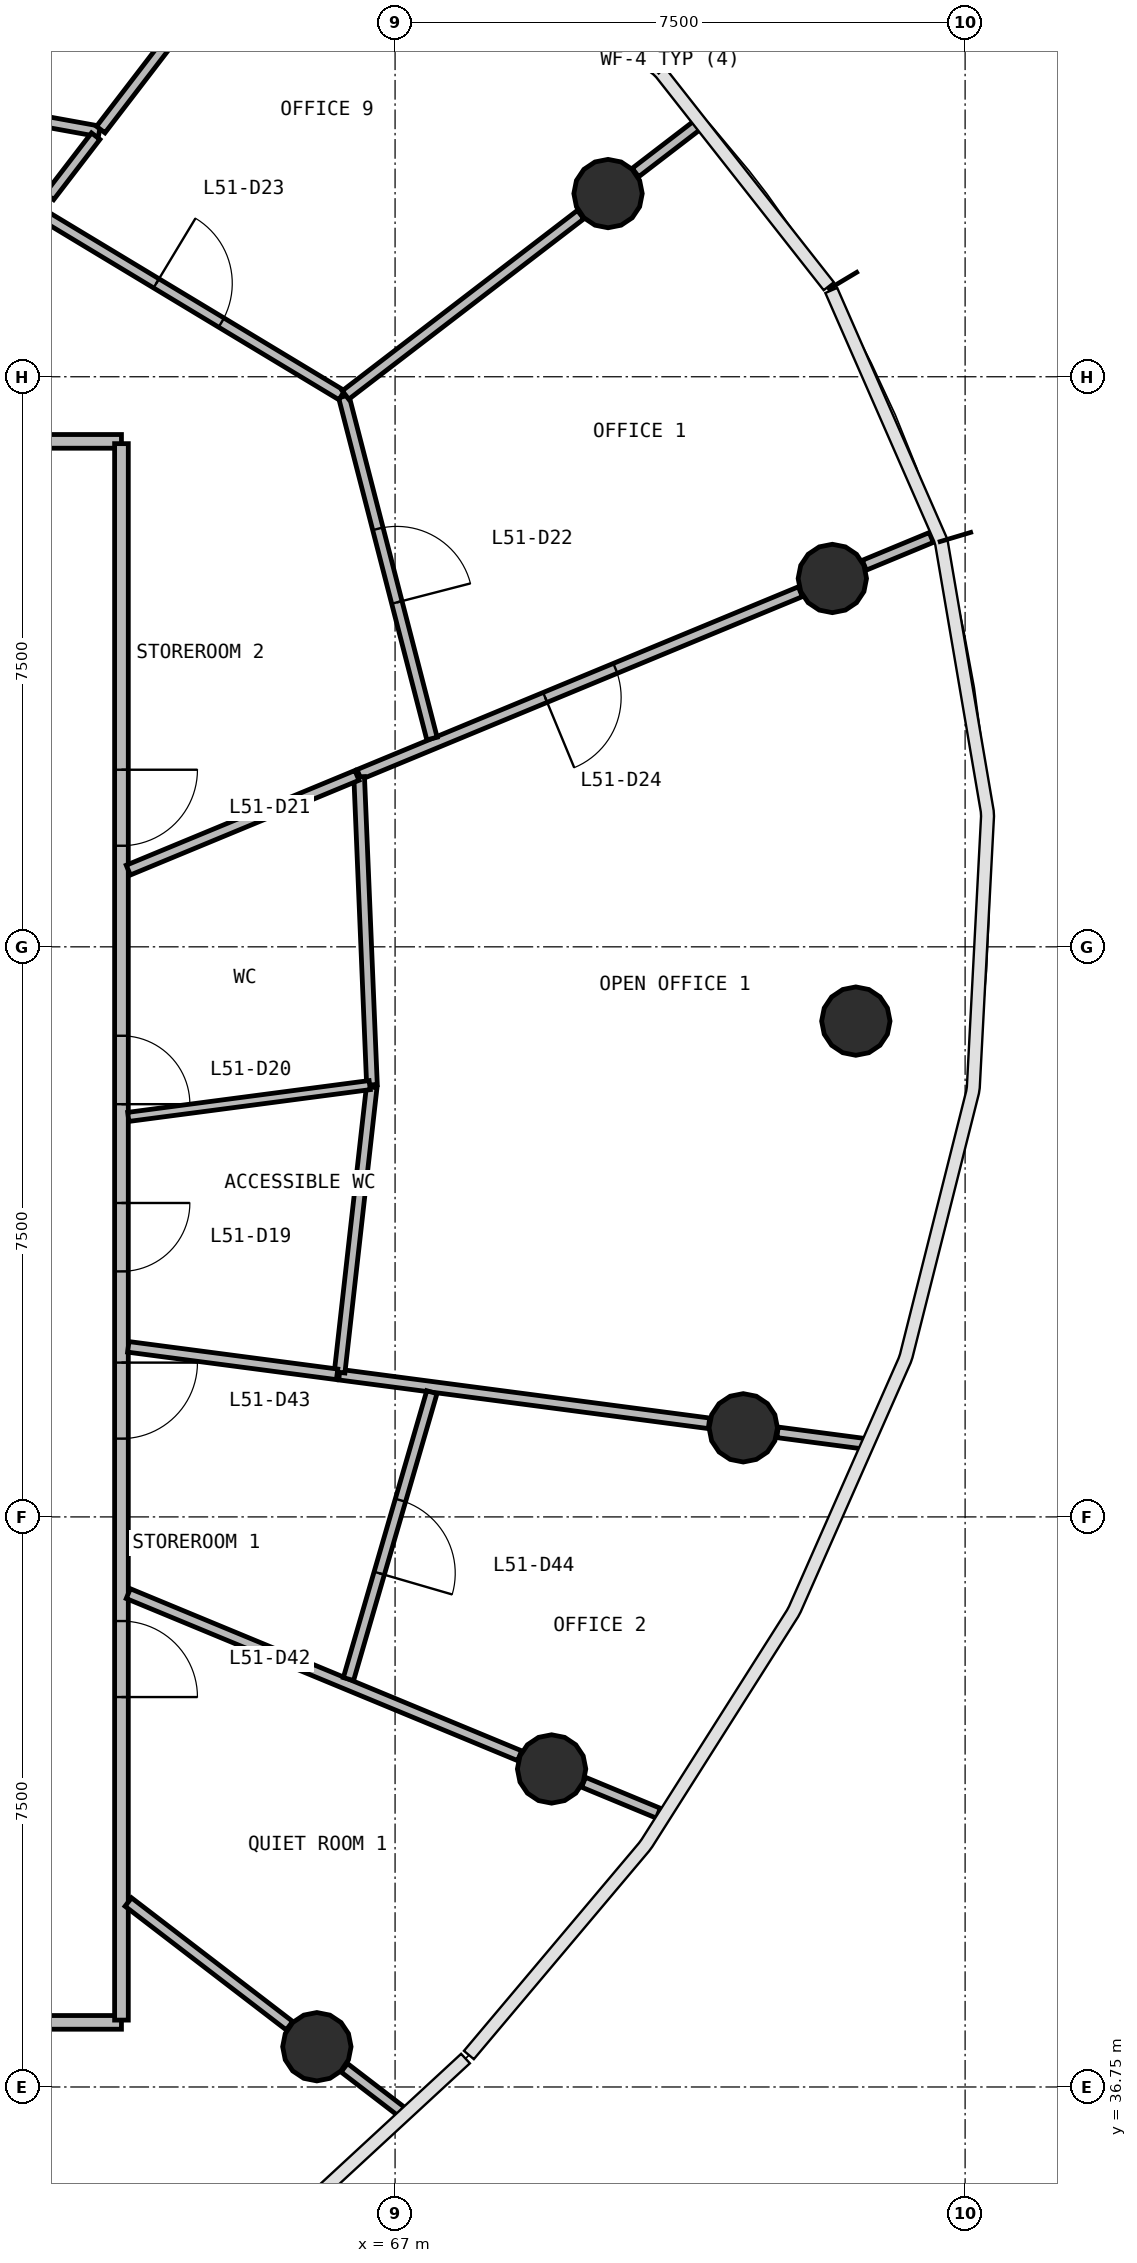
"""IFC4 building model, lengths in metres.
Left out: names, types, materials, properties, quantities, classifications, styles, units other than length and angle.
Written with IfcOpenShell. Run it as: python <this file> out.ifc"""

import sys

from ifc_helpers import new_model, si_unit, direction, frame, frame_2d, origin, origin_2d, place, context, subcontext, project, spatial, rectangle, circle, extrude, source, transform, mapped, element, fill, save


model = new_model("IFC4")
c1 = context("Model", 3, precision=1e-05, world=origin(), true_north=direction((0.0, 1.0)))
c2 = subcontext(c1, "Body", "Model", "MODEL_VIEW")
j1 = project(units=[si_unit("LENGTHUNIT", "METRE"), si_unit("PLANEANGLEUNIT", "RADIAN")], contexts=[c1])
p1 = place(None, origin())
s1 = spatial("IfcSite", under=j1, at=p1, CompositionType="ELEMENT")
p2 = place(p1, origin())
s2 = spatial("IfcBuilding", under=s1, at=p2, CompositionType="ELEMENT")
p3 = place(p2, frame((0.0, 0.0, 211.1)))
s3 = spatial("IfcBuildingStorey", under=s2, at=p3, CompositionType="ELEMENT", Elevation=211.1)
m1 = source(origin(), c2, "Body", "SweptSolid", [
    extrude(circle(Radius=0.45, at=origin_2d()), origin(), (0.0, 0.0, 1.0), 3.9),
])
for number, where, z_axis, x_axis in (
    (1, (73.062, 50.773, 0.0), (0.0, 0.0, 1.0), (1.0, 0.0, 0.0)),
    (2, (72.753, 56.596, 0.0), (0.0, 0.0, 1.0), (1.0, 0.0, 0.0)),
    (3, (69.802, 61.66, 0.0), (0.0, 0.0, 1.0), (1.0, 0.0, 0.0)),
    (4, (65.971, 37.28, 0.0), (0.0, 0.0, 1.0), (1.0, 0.0, 0.0)),
    (5, (69.059, 40.934, 0.0), (0.0, 0.0, 1.0), (1.0, 0.0, 0.0)),
    (6, (71.581, 45.422, 0.0), (0.0, 0.0, 1.0), (1.0, 0.0, 0.0)),
):
    element("IfcColumn", number, at=place(p3, frame(where, z_axis=z_axis, x_axis=x_axis)), inside=s3, PredefinedType="COLUMN", context=c2, shape_type="MappedRepresentation", body=[
        mapped(m1, transform((0.0, 0.0, 0.0), scale=1.0)),
    ])
p4 = place(p3, frame((40.6, 58.4, 0.0), z_axis=(0.0, 0.0, 1.0), x_axis=(1.0, 0.0, 0.0)))
e7 = element("IfcWall", 7, at=p4, inside=s3, PredefinedType="PARTITIONING", context=c2, shape_type="SweptSolid", body=[
    extrude(rectangle(XDim=22.8, YDim=0.18, at=frame_2d((11.4, 0.0))), origin(), (0.0, 0.0, 1.0), 2.88),
])
p5 = place(p4, frame((12.95, 0.0, 0.0)))
e8 = element("IfcOpeningElement", 8, at=p5, cuts=e7, PredefinedType="OPENING", context=c2, shape_type="SweptSolid", body=[
    extrude(rectangle(XDim=1.0, YDim=2.1, at=frame_2d((0.5, 1.05))), frame((0.0, 0.1, 0.0), z_axis=(0.0, -1.0, 0.0), x_axis=(1.0, 0.0, 0.0)), (0.0, 0.0, 1.0), 0.2),
])
p6 = place(p4, frame((10.95, 0.0, 0.0)))
e9 = element("IfcOpeningElement", 9, at=p6, cuts=e7, PredefinedType="OPENING", context=c2, shape_type="SweptSolid", body=[
    extrude(rectangle(XDim=1.0, YDim=2.1, at=frame_2d((0.5, 1.05))), frame((0.0, 0.1, 0.0), z_axis=(0.0, -1.0, 0.0), x_axis=(1.0, 0.0, 0.0)), (0.0, 0.0, 1.0), 0.2),
])
p7 = place(p3, frame((63.4, 37.6, 0.0), z_axis=(0.0, 0.0, 1.0), x_axis=(-1.0, 0.0, 0.0)))
e10 = element("IfcWall", 10, at=p7, inside=s3, PredefinedType="PARTITIONING", context=c2, shape_type="SweptSolid", body=[
    extrude(rectangle(XDim=22.8, YDim=0.18, at=frame_2d((11.4, 0.0))), origin(), (0.0, 0.0, 1.0), 2.88),
])
p8 = place(p7, frame((12.95, 0.0, 0.0)))
e11 = element("IfcOpeningElement", 11, at=p8, cuts=e10, PredefinedType="OPENING", context=c2, shape_type="SweptSolid", body=[
    extrude(rectangle(XDim=1.0, YDim=2.1, at=frame_2d((0.5, 1.05))), frame((0.0, 0.1, 0.0), z_axis=(0.0, -1.0, 0.0), x_axis=(1.0, 0.0, 0.0)), (0.0, 0.0, 1.0), 0.2),
])
p9 = place(p7, frame((10.95, 0.0, 0.0)))
e12 = element("IfcOpeningElement", 12, at=p9, cuts=e10, PredefinedType="OPENING", context=c2, shape_type="SweptSolid", body=[
    extrude(rectangle(XDim=1.0, YDim=2.1, at=frame_2d((0.5, 1.05))), frame((0.0, 0.1, 0.0), z_axis=(0.0, -1.0, 0.0), x_axis=(1.0, 0.0, 0.0)), (0.0, 0.0, 1.0), 0.2),
])
p10 = place(p7, frame((5.75, 0.0, 0.0)))
e13 = element("IfcOpeningElement", 13, at=p10, cuts=e10, PredefinedType="OPENING", context=c2, shape_type="SweptSolid", body=[
    extrude(rectangle(XDim=1.0, YDim=2.1, at=frame_2d((0.5, 1.05))), frame((0.0, 0.1, 0.0), z_axis=(0.0, -1.0, 0.0), x_axis=(1.0, 0.0, 0.0)), (0.0, 0.0, 1.0), 0.2),
])
p11 = place(p3, frame((63.4, 58.37, 0.0), z_axis=(0.0, 0.0, 1.0), x_axis=(0.0, -1.0, 0.0)))
e14 = element("IfcWall", 14, at=p11, inside=s3, PredefinedType="PARTITIONING", context=c2, shape_type="SweptSolid", body=[
    extrude(rectangle(XDim=20.74, YDim=0.18, at=frame_2d((10.37, 0.0))), origin(), (0.0, 0.0, 1.0), 2.88),
])
p12 = place(p11, frame((9.99, 0.0, 0.0)))
e15 = element("IfcOpeningElement", 15, at=p12, cuts=e14, PredefinedType="OPENING", context=c2, shape_type="SweptSolid", body=[
    extrude(rectangle(XDim=0.9, YDim=2.1, at=frame_2d((0.45, 1.05))), frame((0.0, 0.1, 0.0), z_axis=(0.0, -1.0, 0.0), x_axis=(1.0, 0.0, 0.0)), (0.0, 0.0, 1.0), 0.2),
])
p13 = place(p11, frame((7.79, 0.0, 0.0)))
e16 = element("IfcOpeningElement", 16, at=p13, cuts=e14, PredefinedType="OPENING", context=c2, shape_type="SweptSolid", body=[
    extrude(rectangle(XDim=0.9, YDim=2.1, at=frame_2d((0.45, 1.05))), frame((0.0, 0.1, 0.0), z_axis=(0.0, -1.0, 0.0), x_axis=(1.0, 0.0, 0.0)), (0.0, 0.0, 1.0), 0.2),
])
p14 = place(p11, frame((4.29, 0.0, 0.0)))
e17 = element("IfcOpeningElement", 17, at=p14, cuts=e14, PredefinedType="OPENING", context=c2, shape_type="SweptSolid", body=[
    extrude(rectangle(XDim=1.0, YDim=2.1, at=frame_2d((0.5, 1.05))), frame((0.0, 0.1, 0.0), z_axis=(0.0, -1.0, 0.0), x_axis=(1.0, 0.0, 0.0)), (0.0, 0.0, 1.0), 0.2),
])
p15 = place(p11, frame((15.49, 0.0, 0.0)))
e18 = element("IfcOpeningElement", 18, at=p15, cuts=e14, PredefinedType="OPENING", context=c2, shape_type="SweptSolid", body=[
    extrude(rectangle(XDim=1.0, YDim=2.1, at=frame_2d((0.5, 1.05))), frame((0.0, 0.1, 0.0), z_axis=(0.0, -1.0, 0.0), x_axis=(1.0, 0.0, 0.0)), (0.0, 0.0, 1.0), 0.2),
])
p16 = place(p11, frame((12.09, 0.0, 0.0)))
e19 = element("IfcOpeningElement", 19, at=p16, cuts=e14, PredefinedType="OPENING", context=c2, shape_type="SweptSolid", body=[
    extrude(rectangle(XDim=1.0, YDim=2.1, at=frame_2d((0.5, 1.05))), frame((0.0, 0.1, 0.0), z_axis=(0.0, -1.0, 0.0), x_axis=(1.0, 0.0, 0.0)), (0.0, 0.0, 1.0), 0.2),
])
p17 = place(p3, frame((72.333, 56.422, 0.0), z_axis=(0.0, 0.0, 1.0), x_axis=(-0.92388853292, -0.382661702733, 0.0)))
e20 = element("IfcWall", 20, at=p17, inside=s3, PredefinedType="PARTITIONING", context=c2, shape_type="SweptSolid", body=[
    extrude(rectangle(XDim=6.285, YDim=0.14, at=frame_2d((3.143, 0.0))), origin(), (0.0, 0.0, 1.0), 2.88),
])
p18 = place(p17, frame((2.635, 0.0, 0.0)))
e21 = element("IfcOpeningElement", 21, at=p18, cuts=e20, PredefinedType="OPENING", context=c2, shape_type="SweptSolid", body=[
    extrude(rectangle(XDim=1.0, YDim=2.1, at=frame_2d((0.5, 1.05))), frame((0.0, 0.08, 0.0), z_axis=(0.0, -1.0, 0.0), x_axis=(1.0, 0.0, 0.0)), (0.0, 0.0, 1.0), 0.16),
])
p19 = place(p3, frame((68.639, 41.108, 0.0), z_axis=(0.0, 0.0, 1.0), x_axis=(-0.9238758778, 0.382692255499, 0.0)))
e22 = element("IfcWall", 22, at=p19, inside=s3, PredefinedType="PARTITIONING", context=c2, shape_type="SweptSolid", body=[
    extrude(rectangle(XDim=5.573, YDim=0.14, at=frame_2d((2.787, 0.0))), origin(), (0.0, 0.0, 1.0), 2.88),
])
p20 = place(p3, frame((66.267, 46.122, 0.0), z_axis=(0.0, 0.0, 1.0), x_axis=(0.991448195842, -0.130500861923, 0.0)))
e23 = element("IfcWall", 23, at=p20, inside=s3, PredefinedType="PARTITIONING", context=c2, shape_type="SweptSolid", body=[
    extrude(rectangle(XDim=4.905, YDim=0.14, at=frame_2d((2.453, 0.0))), origin(), (0.0, 0.0, 1.0), 2.88),
])
p21 = place(p3, frame((58.354, 63.339, 0.0), z_axis=(0.0, 0.0, 1.0), x_axis=(0.983980456021, -0.178276364581, 0.0)))
e24 = element("IfcWall", 24, at=p21, inside=s3, PredefinedType="PARTITIONING", context=c2, shape_type="SweptSolid", body=[
    extrude(rectangle(XDim=4.833, YDim=0.14, at=frame_2d((2.417, 0.0))), origin(), (0.0, 0.0, 1.0), 2.88),
])
p22 = place(p21, frame((1.983, 0.0, 0.0)))
e25 = element("IfcOpeningElement", 25, at=p22, cuts=e24, PredefinedType="OPENING", context=c2, shape_type="SweptSolid", body=[
    extrude(rectangle(XDim=1.0, YDim=2.1, at=frame_2d((0.5, 1.05))), frame((0.0, 0.08, 0.0), z_axis=(0.0, -1.0, 0.0), x_axis=(1.0, 0.0, 0.0)), (0.0, 0.0, 1.0), 0.16),
])
p23 = place(p3, frame((66.324, 58.991, 0.0), z_axis=(0.0, 0.0, 1.0), x_axis=(0.249819251726, -0.968292487561, 0.0)))
e26 = element("IfcWall", 26, at=p23, inside=s3, PredefinedType="PARTITIONING", context=c2, shape_type="SweptSolid", body=[
    extrude(rectangle(XDim=4.649, YDim=0.14, at=frame_2d((2.324, 0.0))), origin(), (0.0, 0.0, 1.0), 2.88),
])
p24 = place(p23, frame((1.799, 0.0, 0.0)))
e27 = element("IfcOpeningElement", 27, at=p24, cuts=e26, PredefinedType="OPENING", context=c2, shape_type="SweptSolid", body=[
    extrude(rectangle(XDim=1.0, YDim=2.1, at=frame_2d((0.5, 1.05))), frame((0.0, 0.08, 0.0), z_axis=(0.0, -1.0, 0.0), x_axis=(1.0, 0.0, 0.0)), (0.0, 0.0, 1.0), 0.16),
])
p25 = place(p3, frame((62.298, 61.42, 0.0), z_axis=(0.0, 0.0, 1.0), x_axis=(0.856310382511, -0.516461546298, 0.0)))
e28 = element("IfcWall", 28, at=p25, inside=s3, PredefinedType="PARTITIONING", context=c2, shape_type="SweptSolid", body=[
    extrude(rectangle(XDim=4.672, YDim=0.14, at=frame_2d((2.336, 0.0))), origin(), (0.0, 0.0, 1.0), 2.88),
])
p26 = place(p25, frame((1.823, 0.0, 0.0)))
e29 = element("IfcOpeningElement", 29, at=p26, cuts=e28, PredefinedType="OPENING", context=c2, shape_type="SweptSolid", body=[
    extrude(rectangle(XDim=1.0, YDim=2.1, at=frame_2d((0.5, 1.05))), frame((0.0, 0.08, 0.0), z_axis=(0.0, -1.0, 0.0), x_axis=(1.0, 0.0, 0.0)), (0.0, 0.0, 1.0), 0.16),
])
p27 = place(p3, frame((66.696, 49.935, 0.0), z_axis=(0.0, 0.0, 1.0), x_axis=(-0.041535399008, 0.999137032959, 0.0)))
e30 = element("IfcWall", 30, at=p27, inside=s3, PredefinedType="PARTITIONING", context=c2, shape_type="SweptSolid", body=[
    extrude(rectangle(XDim=4.056, YDim=0.14, at=frame_2d((2.028, 0.0))), origin(), (0.0, 0.0, 1.0), 2.88),
])
p28 = place(p3, frame((67.484, 45.891, 0.0), z_axis=(0.0, 0.0, 1.0), x_axis=(-0.279262901939, -0.960214679955, 0.0)))
e31 = element("IfcWall", 31, at=p28, inside=s3, PredefinedType="PARTITIONING", context=c2, shape_type="SweptSolid", body=[
    extrude(rectangle(XDim=3.931, YDim=0.14, at=frame_2d((1.965, 0.0))), origin(), (0.0, 0.0, 1.0), 2.88),
])
p29 = place(p28, frame((1.481, 0.0, 0.0)))
e32 = element("IfcOpeningElement", 32, at=p29, cuts=e31, PredefinedType="OPENING", context=c2, shape_type="SweptSolid", body=[
    extrude(rectangle(XDim=1.0, YDim=2.1, at=frame_2d((0.5, 1.05))), frame((0.0, 0.08, 0.0), z_axis=(0.0, -1.0, 0.0), x_axis=(1.0, 0.0, 0.0)), (0.0, 0.0, 1.0), 0.16),
])
p30 = place(p3, frame((66.348, 59.01, 0.0), z_axis=(0.0, 0.0, 1.0), x_axis=(0.793347300472, 0.608769300173, 0.0)))
e33 = element("IfcWall", 33, at=p30, inside=s3, PredefinedType="PARTITIONING", context=c2, shape_type="SweptSolid", body=[
    extrude(rectangle(XDim=3.899, YDim=0.14, at=frame_2d((1.95, 0.0))), origin(), (0.0, 0.0, 1.0), 2.88),
])
p31 = place(p3, frame((66.271, 46.152, 0.0), z_axis=(0.0, 0.0, 1.0), x_axis=(0.111758070994, 0.993735444456, 0.0)))
e34 = element("IfcWall", 34, at=p31, inside=s3, PredefinedType="PARTITIONING", context=c2, shape_type="SweptSolid", body=[
    extrude(rectangle(XDim=3.777, YDim=0.14, at=frame_2d((1.889, 0.0))), origin(), (0.0, 0.0, 1.0), 2.88),
])
p32 = place(p3, frame((62.453, 61.622, 0.0), z_axis=(0.0, 0.0, 1.0), x_axis=(0.608872401912, 0.793268175455, 0.0)))
e35 = element("IfcWall", 35, at=p32, inside=s3, PredefinedType="PARTITIONING", context=c2, shape_type="SweptSolid", body=[
    extrude(rectangle(XDim=1.0, YDim=0.14, at=frame_2d((0.5, 0.0))), origin(), (0.0, 0.0, 1.0), 2.88),
])
p33 = place(p3, frame((63.127, 62.501, 0.0), z_axis=(0.0, 0.0, 1.0), x_axis=(0.608750837214, 0.793361467549, 0.0)))
e36 = element("IfcWall", 36, at=p33, inside=s3, PredefinedType="PARTITIONING", context=c2, shape_type="SweptSolid", body=[
    extrude(rectangle(XDim=2.472, YDim=0.14, at=frame_2d((1.236, 0.0))), origin(), (0.0, 0.0, 1.0), 2.88),
])
p34 = place(p3, frame((63.49, 52.759, 0.0), z_axis=(0.0, 0.0, 1.0), x_axis=(0.923862401464, 0.382724787753, 0.0)))
e37 = element("IfcWall", 37, at=p34, inside=s3, PredefinedType="PARTITIONING", context=c2, shape_type="SweptSolid", body=[
    extrude(rectangle(XDim=3.257, YDim=0.14, at=frame_2d((1.628, 0.0))), origin(), (0.0, 0.0, 1.0), 2.88),
])
p35 = place(p3, frame((63.49, 46.487, 0.0), z_axis=(0.0, 0.0, 1.0), x_axis=(0.991438994906, -0.13057074473, 0.0)))
e38 = element("IfcWall", 38, at=p35, inside=s3, PredefinedType="PARTITIONING", context=c2, shape_type="SweptSolid", body=[
    extrude(rectangle(XDim=2.771, YDim=0.14, at=frame_2d((1.385, 0.0))), origin(), (0.0, 0.0, 1.0), 2.88),
])
p36 = place(p3, frame((63.49, 39.183, 0.0), z_axis=(0.0, 0.0, 1.0), x_axis=(0.793363703091, -0.608747923707, 0.0)))
e39 = element("IfcWall", 39, at=p36, inside=s3, PredefinedType="PARTITIONING", context=c2, shape_type="SweptSolid", body=[
    extrude(rectangle(XDim=2.673, YDim=0.14, at=frame_2d((1.336, 0.0))), origin(), (0.0, 0.0, 1.0), 2.88),
])
p37 = place(p3, frame((72.031, 45.363, 0.0), z_axis=(0.0, 0.0, 1.0), x_axis=(0.99143621724, -0.130591834141, 0.0)))
e40 = element("IfcWall", 40, at=p37, inside=s3, PredefinedType="PARTITIONING", context=c2, shape_type="SweptSolid", body=[
    extrude(rectangle(XDim=1.15, YDim=0.14, at=frame_2d((0.575, 0.0))), origin(), (0.0, 0.0, 1.0), 2.88),
])
p38 = place(p3, frame((70.464, 40.352, 0.0), z_axis=(0.0, 0.0, 1.0), x_axis=(-0.923921911664, 0.382581104012, 0.0)))
e41 = element("IfcWall", 41, at=p38, inside=s3, PredefinedType="PARTITIONING", context=c2, shape_type="SweptSolid", body=[
    extrude(rectangle(XDim=1.066, YDim=0.14, at=frame_2d((0.533, 0.0))), origin(), (0.0, 0.0, 1.0), 2.88),
])
p39 = place(p3, frame((70.163, 61.937, 0.0), z_axis=(0.0, 0.0, 1.0), x_axis=(0.793403619358, 0.608695898449, 0.0)))
e42 = element("IfcWall", 42, at=p39, inside=s3, PredefinedType="PARTITIONING", context=c2, shape_type="SweptSolid", body=[
    extrude(rectangle(XDim=1.047, YDim=0.14, at=frame_2d((0.523, 0.0))), origin(), (0.0, 0.0, 1.0), 2.88),
])
p40 = place(p3, frame((73.174, 56.77, 0.0), z_axis=(0.0, 0.0, 1.0), x_axis=(0.923779659408, 0.38292445843, 0.0)))
e43 = element("IfcWall", 43, at=p40, inside=s3, PredefinedType="PARTITIONING", context=c2, shape_type="SweptSolid", body=[
    extrude(rectangle(XDim=0.954, YDim=0.14, at=frame_2d((0.477, 0.0))), origin(), (0.0, 0.0, 1.0), 2.88),
])
p41 = place(p3, frame((66.332, 37.003, 0.0), z_axis=(0.0, 0.0, 1.0), x_axis=(0.793344167197, -0.608773383431, 0.0)))
e44 = element("IfcWall", 44, at=p41, inside=s3, PredefinedType="PARTITIONING", context=c2, shape_type="SweptSolid", body=[
    extrude(rectangle(XDim=0.944, YDim=0.14, at=frame_2d((0.472, 0.0))), origin(), (0.0, 0.0, 1.0), 2.88),
])
p42 = place(p3, frame((63.49, 49.513, 0.0), z_axis=(0.0, 0.0, 1.0), x_axis=(0.991442878973, 0.130541249168, 0.0)))
e45 = element("IfcWall", 45, at=p42, inside=s3, PredefinedType="PARTITIONING", context=c2, shape_type="SweptSolid", body=[
    extrude(rectangle(XDim=3.204, YDim=0.12, at=frame_2d((1.602, 0.0))), origin(), (0.0, 0.0, 1.0), 2.88),
])
m2 = source(origin(), c2, "Body", "SweptSolid", [
    extrude(rectangle(XDim=0.9, YDim=2.1, at=frame_2d((0.45, 1.05))), frame((0.0, 0.025, 0.0), z_axis=(0.0, -1.0, 0.0), x_axis=(1.0, 0.0, 0.0)), (0.0, 0.0, 1.0), 0.05),
])
p43 = place(p12, origin())
e46 = element("IfcDoor", 46, at=p43, inside=s3, OperationType="SINGLE_SWING_LEFT", PredefinedType="DOOR", context=c2, shape_type="MappedRepresentation", body=[
    mapped(m2, transform((0.0, 0.0, 0.0), scale=1.0)),
])
fill(e15, e46)
p44 = place(p13, origin())
e47 = element("IfcDoor", 47, at=p44, inside=s3, OperationType="SINGLE_SWING_RIGHT", PredefinedType="DOOR", context=c2, shape_type="MappedRepresentation", body=[
    mapped(m2, transform((0.0, 0.0, 0.0), scale=1.0)),
])
fill(e16, e47)
m3 = source(origin(), c2, "Body", "SweptSolid", [
    extrude(rectangle(XDim=1.0, YDim=2.1, at=frame_2d((0.5, 1.05))), frame((0.0, 0.025, 0.0), z_axis=(0.0, -1.0, 0.0), x_axis=(1.0, 0.0, 0.0)), (0.0, 0.0, 1.0), 0.05),
])
p45 = place(p14, origin())
e48 = element("IfcDoor", 48, at=p45, inside=s3, OperationType="SINGLE_SWING_LEFT", PredefinedType="DOOR", context=c2, shape_type="MappedRepresentation", body=[
    mapped(m3, transform((0.0, 0.0, 0.0), scale=1.0)),
])
fill(e17, e48)
p46 = place(p24, origin())
e49 = element("IfcDoor", 49, at=p46, inside=s3, OperationType="SINGLE_SWING_RIGHT", PredefinedType="DOOR", context=c2, shape_type="MappedRepresentation", body=[
    mapped(m3, transform((0.0, 0.0, 0.0), scale=1.0)),
])
fill(e27, e49)
p47 = place(p26, origin())
e50 = element("IfcDoor", 50, at=p47, inside=s3, OperationType="SINGLE_SWING_LEFT", PredefinedType="DOOR", context=c2, shape_type="MappedRepresentation", body=[
    mapped(m3, transform((0.0, 0.0, 0.0), scale=1.0)),
])
fill(e29, e50)
p48 = place(p18, origin())
e51 = element("IfcDoor", 51, at=p48, inside=s3, OperationType="SINGLE_SWING_RIGHT", PredefinedType="DOOR", context=c2, shape_type="MappedRepresentation", body=[
    mapped(m3, transform((0.0, 0.0, 0.0), scale=1.0)),
])
fill(e21, e51)
p49 = place(p15, origin())
e52 = element("IfcDoor", 52, at=p49, inside=s3, OperationType="SINGLE_SWING_RIGHT", PredefinedType="DOOR", context=c2, shape_type="MappedRepresentation", body=[
    mapped(m3, transform((0.0, 0.0, 0.0), scale=1.0)),
])
fill(e18, e52)
p50 = place(p16, origin())
e53 = element("IfcDoor", 53, at=p50, inside=s3, OperationType="SINGLE_SWING_LEFT", PredefinedType="DOOR", context=c2, shape_type="MappedRepresentation", body=[
    mapped(m3, transform((0.0, 0.0, 0.0), scale=1.0)),
])
fill(e19, e53)
p51 = place(p29, origin())
e54 = element("IfcDoor", 54, at=p51, inside=s3, OperationType="SINGLE_SWING_RIGHT", PredefinedType="DOOR", context=c2, shape_type="MappedRepresentation", body=[
    mapped(m3, transform((0.0, 0.0, 0.0), scale=1.0)),
])
fill(e32, e54)
save(model, sys.argv[1])
